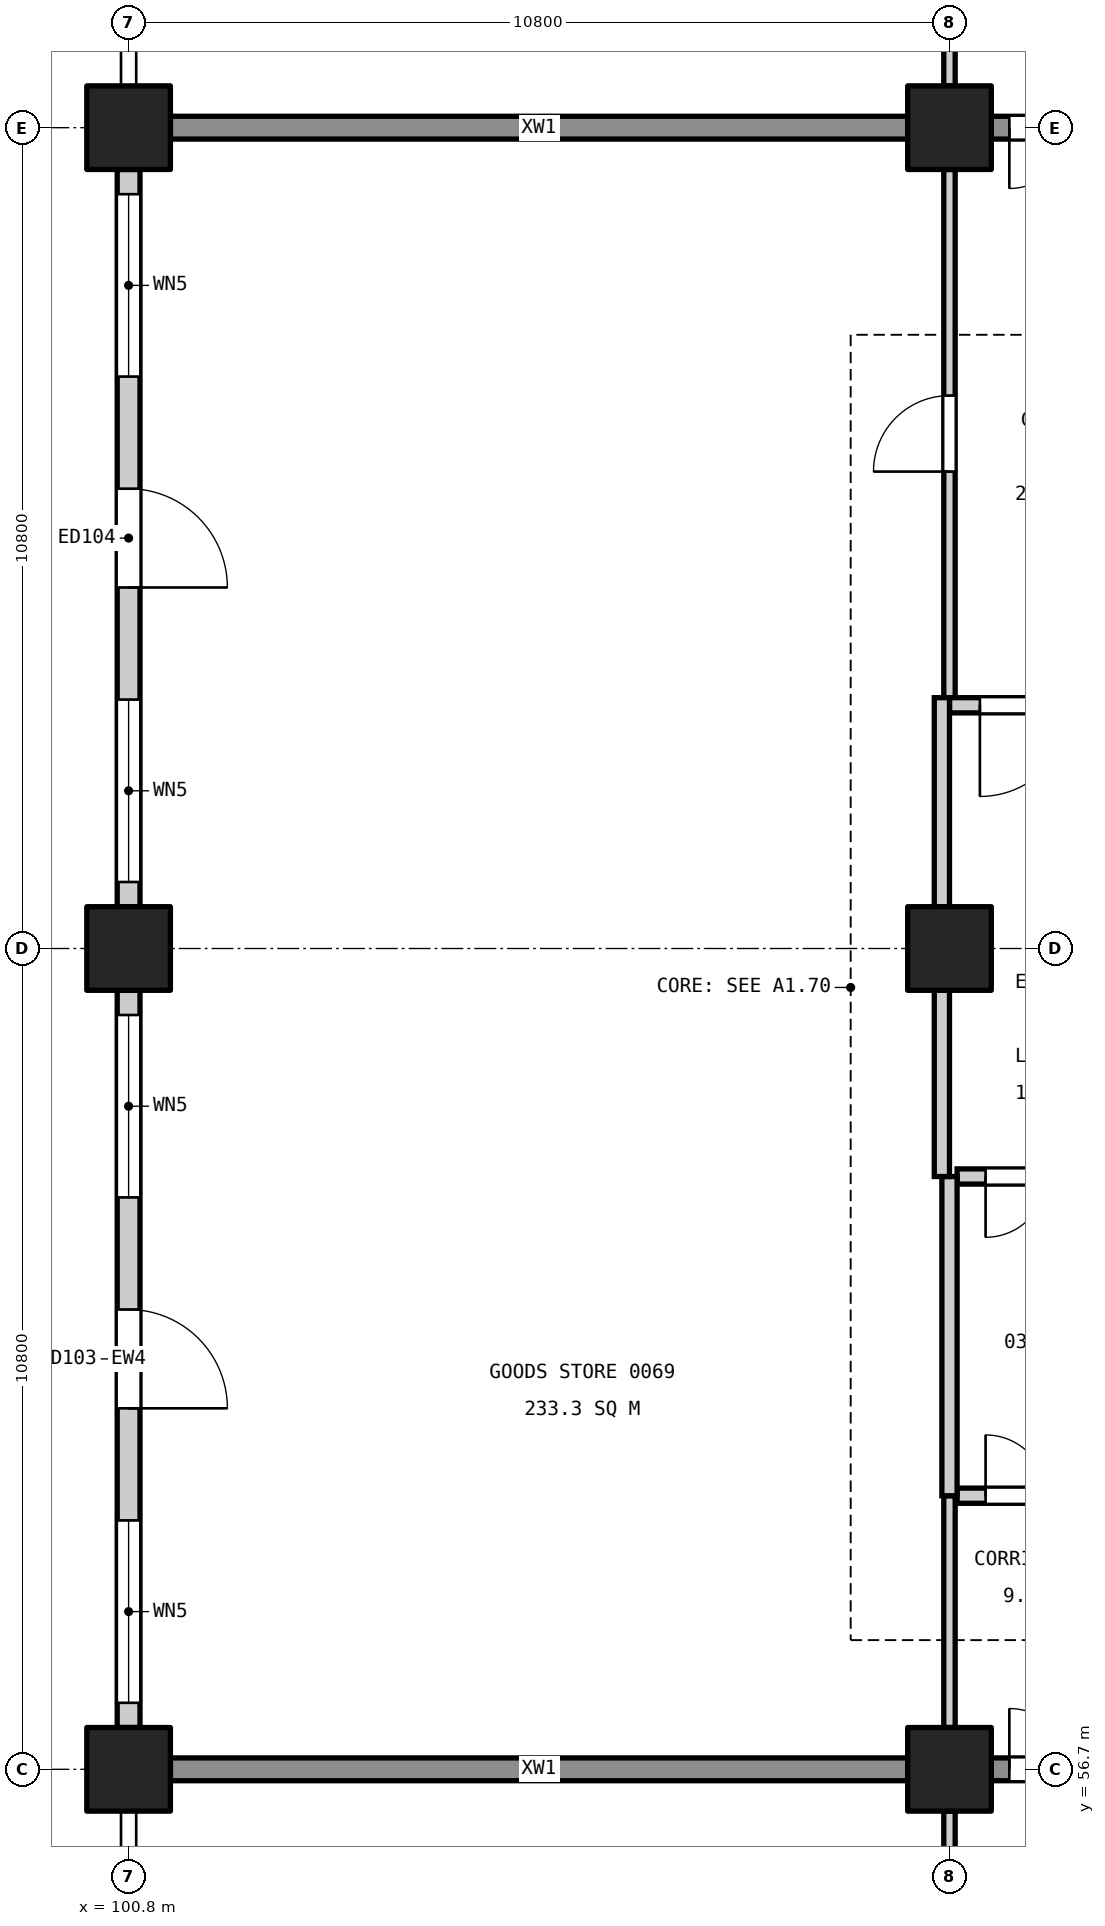
"""IFC4 building model, lengths in metres.
Left out: names, types, materials, properties, quantities, classifications, styles, units other than length and angle.
Written with IfcOpenShell. Run it as: python <this file> out.ifc"""

import sys

from ifc_helpers import new_model, si_unit, direction, frame, frame_2d, origin, origin_2d, place, context, subcontext, project, spatial, rectangle, extrude, element, fill, save


model = new_model("IFC4")
c1 = context("Model", 3, precision=1e-05, world=origin(), true_north=direction((0.0, 1.0)))
c2 = subcontext(c1, "Body", "Model", "MODEL_VIEW")
j1 = project(units=[si_unit("LENGTHUNIT", "METRE"), si_unit("PLANEANGLEUNIT", "RADIAN")], contexts=[c1])
p1 = place(None, origin())
s1 = spatial("IfcSite", under=j1, at=p1, CompositionType="ELEMENT")
p2 = place(p1, origin())
s2 = spatial("IfcBuilding", under=s1, at=p2, CompositionType="ELEMENT")
p3 = place(p2, origin())
s3 = spatial("IfcBuildingStorey", under=s2, at=p3, CompositionType="ELEMENT", Elevation=0.0)
for number, where, z_axis, x_axis in (
    (1, (111.6, 56.7, 0.0), (0.0, 0.0, 1.0), (1.0, 0.0, 0.0)),
    (2, (111.6, 67.5, 0.0), (0.0, 0.0, 1.0), (1.0, 0.0, 0.0)),
    (3, (111.6, 78.3, 0.0), (0.0, 0.0, 1.0), (1.0, 0.0, 0.0)),
    (4, (100.8, 56.7, 0.0), (0.0, 0.0, 1.0), (1.0, 0.0, 0.0)),
    (5, (100.8, 67.5, 0.0), (0.0, 0.0, 1.0), (1.0, 0.0, 0.0)),
    (6, (100.8, 78.3, 0.0), (0.0, 0.0, 1.0), (1.0, 0.0, 0.0)),
):
    element("IfcColumn", number, at=place(p3, frame(where, z_axis=z_axis, x_axis=x_axis)), inside=s3, PredefinedType="COLUMN", context=c2, shape_type="SweptSolid", body=[
        extrude(rectangle(XDim=1.1, YDim=1.1, at=origin_2d()), origin(), (0.0, 0.0, 1.0), 6.0),
    ])
p4 = place(p3, frame((118.25, 56.7, 0.0), z_axis=(0.0, 0.0, 1.0), x_axis=(-1.0, 0.0, 0.0)))
e7 = element("IfcWall", 7, at=p4, inside=s3, PredefinedType="SHEAR", context=c2, shape_type="SweptSolid", body=[
    extrude(rectangle(XDim=6.1, YDim=0.3, at=frame_2d((3.05, 0.0))), origin(), (0.0, 0.0, 1.0), 5.7),
])
p5 = place(p4, frame((4.262, 0.0, 0.0)))
e8 = element("IfcOpeningElement", 8, at=p5, cuts=e7, PredefinedType="OPENING", context=c2, shape_type="SweptSolid", body=[
    extrude(rectangle(XDim=1.6, YDim=2.1, at=frame_2d((0.8, 1.05))), frame((0.0, 0.16, 0.0), z_axis=(0.0, -1.0, 0.0), x_axis=(1.0, 0.0, 0.0)), (0.0, 0.0, 1.0), 0.32),
])
p6 = place(p3, frame((111.05, 56.7, 0.0), z_axis=(0.0, 0.0, 1.0), x_axis=(-1.0, 0.0, 0.0)))
e9 = element("IfcWall", 9, at=p6, inside=s3, PredefinedType="SHEAR", context=c2, shape_type="SweptSolid", body=[
    extrude(rectangle(XDim=9.7, YDim=0.3, at=frame_2d((4.85, 0.0))), origin(), (0.0, 0.0, 1.0), 5.7),
])
p7 = place(p3, frame((118.25, 78.3, 0.0), z_axis=(0.0, 0.0, 1.0), x_axis=(-1.0, 0.0, 0.0)))
e10 = element("IfcWall", 10, at=p7, inside=s3, PredefinedType="SHEAR", context=c2, shape_type="SweptSolid", body=[
    extrude(rectangle(XDim=6.1, YDim=0.3, at=frame_2d((3.05, 0.0))), origin(), (0.0, 0.0, 1.0), 5.7),
])
p8 = place(p7, frame((4.262, 0.0, 0.0)))
e11 = element("IfcOpeningElement", 11, at=p8, cuts=e10, PredefinedType="OPENING", context=c2, shape_type="SweptSolid", body=[
    extrude(rectangle(XDim=1.6, YDim=2.1, at=frame_2d((0.8, 1.05))), frame((0.0, 0.16, 0.0), z_axis=(0.0, -1.0, 0.0), x_axis=(1.0, 0.0, 0.0)), (0.0, 0.0, 1.0), 0.32),
])
p9 = place(p3, frame((111.05, 78.3, 0.0), z_axis=(0.0, 0.0, 1.0), x_axis=(-1.0, 0.0, 0.0)))
e12 = element("IfcWall", 12, at=p9, inside=s3, PredefinedType="SHEAR", context=c2, shape_type="SweptSolid", body=[
    extrude(rectangle(XDim=9.7, YDim=0.3, at=frame_2d((4.85, 0.0))), origin(), (0.0, 0.0, 1.0), 5.7),
])
p10 = place(p3, frame((100.8, 57.25, 0.0), z_axis=(0.0, 0.0, 1.0), x_axis=(0.0, 1.0, 0.0)))
e13 = element("IfcWall", 13, at=p10, inside=s3, PredefinedType="STANDARD", context=c2, shape_type="SweptSolid", body=[
    extrude(rectangle(XDim=9.7, YDim=0.3, at=frame_2d((4.85, 0.0))), origin(), (0.0, 0.0, 1.0), 4.6),
])
p11 = place(p10, frame((0.325, 0.0, 0.9)))
e14 = element("IfcOpeningElement", 14, at=p11, cuts=e13, PredefinedType="OPENING", context=c2, shape_type="SweptSolid", body=[
    extrude(rectangle(XDim=2.4, YDim=3.0, at=frame_2d((1.2, 1.5))), frame((0.0, 0.16, 0.0), z_axis=(0.0, -1.0, 0.0), x_axis=(1.0, 0.0, 0.0)), (0.0, 0.0, 1.0), 0.32),
])
p12 = place(p10, frame((6.975, 0.0, 0.9)))
e15 = element("IfcOpeningElement", 15, at=p12, cuts=e13, PredefinedType="OPENING", context=c2, shape_type="SweptSolid", body=[
    extrude(rectangle(XDim=2.4, YDim=3.0, at=frame_2d((1.2, 1.5))), frame((0.0, 0.16, 0.0), z_axis=(0.0, -1.0, 0.0), x_axis=(1.0, 0.0, 0.0)), (0.0, 0.0, 1.0), 0.32),
])
p13 = place(p10, frame((4.2, 0.0, 0.0)))
e16 = element("IfcOpeningElement", 16, at=p13, cuts=e13, PredefinedType="OPENING", context=c2, shape_type="SweptSolid", body=[
    extrude(rectangle(XDim=1.3, YDim=2.4, at=frame_2d((0.65, 1.2))), frame((0.0, 0.16, 0.0), z_axis=(0.0, -1.0, 0.0), x_axis=(1.0, 0.0, 0.0)), (0.0, 0.0, 1.0), 0.32),
])
p14 = place(p3, frame((100.8, 68.05, 0.0), z_axis=(0.0, 0.0, 1.0), x_axis=(0.0, 1.0, 0.0)))
e17 = element("IfcWall", 17, at=p14, inside=s3, PredefinedType="STANDARD", context=c2, shape_type="SweptSolid", body=[
    extrude(rectangle(XDim=9.7, YDim=0.3, at=frame_2d((4.85, 0.0))), origin(), (0.0, 0.0, 1.0), 4.6),
])
p15 = place(p14, frame((0.325, 0.0, 0.9)))
e18 = element("IfcOpeningElement", 18, at=p15, cuts=e17, PredefinedType="OPENING", context=c2, shape_type="SweptSolid", body=[
    extrude(rectangle(XDim=2.4, YDim=3.0, at=frame_2d((1.2, 1.5))), frame((0.0, 0.16, 0.0), z_axis=(0.0, -1.0, 0.0), x_axis=(1.0, 0.0, 0.0)), (0.0, 0.0, 1.0), 0.32),
])
p16 = place(p14, frame((6.975, 0.0, 0.9)))
e19 = element("IfcOpeningElement", 19, at=p16, cuts=e17, PredefinedType="OPENING", context=c2, shape_type="SweptSolid", body=[
    extrude(rectangle(XDim=2.4, YDim=3.0, at=frame_2d((1.2, 1.5))), frame((0.0, 0.16, 0.0), z_axis=(0.0, -1.0, 0.0), x_axis=(1.0, 0.0, 0.0)), (0.0, 0.0, 1.0), 0.32),
])
p17 = place(p14, frame((4.2, 0.0, 0.0)))
e20 = element("IfcOpeningElement", 20, at=p17, cuts=e17, PredefinedType="OPENING", context=c2, shape_type="SweptSolid", body=[
    extrude(rectangle(XDim=1.3, YDim=2.4, at=frame_2d((0.65, 1.2))), frame((0.0, 0.16, 0.0), z_axis=(0.0, -1.0, 0.0), x_axis=(1.0, 0.0, 0.0)), (0.0, 0.0, 1.0), 0.32),
])
p18 = place(p3, frame((114.05, 60.3, 0.0), z_axis=(0.0, 0.0, 1.0), x_axis=(-1.0, 0.0, 0.0)))
e21 = element("IfcWall", 21, at=p18, inside=s3, PredefinedType="PARTITIONING", context=c2, shape_type="SweptSolid", body=[
    extrude(rectangle(XDim=2.35, YDim=0.2, at=frame_2d((1.175, 0.0))), origin(), (0.0, 0.0, 1.0), 4.9),
])
p19 = place(p18, frame((0.375, 0.0, 0.0)))
e22 = element("IfcOpeningElement", 22, at=p19, cuts=e21, PredefinedType="OPENING", context=c2, shape_type="SweptSolid", body=[
    extrude(rectangle(XDim=1.6, YDim=2.1, at=frame_2d((0.8, 1.05))), frame((0.0, 0.11, 0.0), z_axis=(0.0, -1.0, 0.0), x_axis=(1.0, 0.0, 0.0)), (0.0, 0.0, 1.0), 0.22),
])
p20 = place(p3, frame((114.05, 64.5, 0.0), z_axis=(0.0, 0.0, 1.0), x_axis=(-1.0, 0.0, 0.0)))
e23 = element("IfcWall", 23, at=p20, inside=s3, PredefinedType="PARTITIONING", context=c2, shape_type="SweptSolid", body=[
    extrude(rectangle(XDim=2.35, YDim=0.2, at=frame_2d((1.175, 0.0))), origin(), (0.0, 0.0, 1.0), 4.6),
])
p21 = place(p20, frame((0.375, 0.0, 0.0)))
e24 = element("IfcOpeningElement", 24, at=p21, cuts=e23, PredefinedType="OPENING", context=c2, shape_type="SweptSolid", body=[
    extrude(rectangle(XDim=1.6, YDim=2.1, at=frame_2d((0.8, 1.05))), frame((0.0, 0.11, 0.0), z_axis=(0.0, -1.0, 0.0), x_axis=(1.0, 0.0, 0.0)), (0.0, 0.0, 1.0), 0.22),
])
p22 = place(p3, frame((111.6, 46.45, 0.0), z_axis=(0.0, 0.0, 1.0), x_axis=(0.0, 1.0, 0.0)))
e25 = element("IfcWall", 25, at=p22, inside=s3, PredefinedType="PARTITIONING", context=c2, shape_type="SweptSolid", body=[
    extrude(rectangle(XDim=9.7, YDim=0.15, at=frame_2d((4.85, 0.0))), origin(), (0.0, 0.0, 1.0), 4.6),
])
p23 = place(p22, frame((4.25, 0.0, 0.0)))
e26 = element("IfcOpeningElement", 26, at=p23, cuts=e25, PredefinedType="OPENING", context=c2, shape_type="SweptSolid", body=[
    extrude(rectangle(XDim=1.2, YDim=2.1, at=frame_2d((0.6, 1.05))), frame((0.0, 0.085, 0.0), z_axis=(0.0, -1.0, 0.0), x_axis=(1.0, 0.0, 0.0)), (0.0, 0.0, 1.0), 0.17),
])
p24 = place(p22, frame((0.925, 0.0, 0.0)))
e27 = element("IfcOpeningElement", 27, at=p24, cuts=e25, PredefinedType="OPENING", context=c2, shape_type="SweptSolid", body=[
    extrude(rectangle(XDim=1.2, YDim=2.1, at=frame_2d((0.6, 1.05))), frame((0.0, 0.085, 0.0), z_axis=(0.0, -1.0, 0.0), x_axis=(1.0, 0.0, 0.0)), (0.0, 0.0, 1.0), 0.17),
])
p25 = place(p22, frame((7.575, 0.0, 0.0)))
e28 = element("IfcOpeningElement", 28, at=p25, cuts=e25, PredefinedType="OPENING", context=c2, shape_type="SweptSolid", body=[
    extrude(rectangle(XDim=1.2, YDim=2.1, at=frame_2d((0.6, 1.05))), frame((0.0, 0.085, 0.0), z_axis=(0.0, -1.0, 0.0), x_axis=(1.0, 0.0, 0.0)), (0.0, 0.0, 1.0), 0.17),
])
p26 = place(p3, frame((111.6, 57.25, 0.0), z_axis=(0.0, 0.0, 1.0), x_axis=(0.0, 1.0, 0.0)))
e29 = element("IfcWall", 29, at=p26, inside=s3, PredefinedType="PARTITIONING", context=c2, shape_type="SweptSolid", body=[
    extrude(rectangle(XDim=3.05, YDim=0.15, at=frame_2d((1.525, 0.0))), origin(), (0.0, 0.0, 1.0), 4.6),
])
p27 = place(p3, frame((111.6, 60.3, 0.0), z_axis=(0.0, 0.0, 1.0), x_axis=(0.0, 1.0, 0.0)))
e30 = element("IfcWall", 30, at=p27, inside=s3, PredefinedType="PARTITIONING", context=c2, shape_type="SweptSolid", body=[
    extrude(rectangle(XDim=4.2, YDim=0.2, at=frame_2d((2.1, 0.0))), origin(), (0.0, 0.0, 1.0), 4.6),
])
p28 = place(p3, frame((111.6, 70.8, 0.0), z_axis=(0.0, 0.0, 1.0), x_axis=(0.0, 1.0, 0.0)))
e31 = element("IfcWall", 31, at=p28, inside=s3, PredefinedType="PARTITIONING", context=c2, shape_type="SweptSolid", body=[
    extrude(rectangle(XDim=6.95, YDim=0.15, at=frame_2d((3.475, 0.0))), origin(), (0.0, 0.0, 1.0), 4.6),
])
p29 = place(p28, frame((2.975, 0.0, 0.0)))
e32 = element("IfcOpeningElement", 32, at=p29, cuts=e31, PredefinedType="OPENING", context=c2, shape_type="SweptSolid", body=[
    extrude(rectangle(XDim=1.0, YDim=2.1, at=frame_2d((0.5, 1.05))), frame((0.0, 0.085, 0.0), z_axis=(0.0, -1.0, 0.0), x_axis=(1.0, 0.0, 0.0)), (0.0, 0.0, 1.0), 0.17),
])
p30 = place(p3, frame((111.6, 78.85, 0.0), z_axis=(0.0, 0.0, 1.0), x_axis=(0.0, 1.0, 0.0)))
e33 = element("IfcWall", 33, at=p30, inside=s3, PredefinedType="PARTITIONING", context=c2, shape_type="SweptSolid", body=[
    extrude(rectangle(XDim=9.7, YDim=0.15, at=frame_2d((4.85, 0.0))), origin(), (0.0, 0.0, 1.0), 4.6),
])
p31 = place(p30, frame((2.725, 0.0, 0.0)))
e34 = element("IfcOpeningElement", 34, at=p31, cuts=e33, PredefinedType="OPENING", context=c2, shape_type="SweptSolid", body=[
    extrude(rectangle(XDim=1.2, YDim=2.1, at=frame_2d((0.6, 1.05))), frame((0.0, 0.085, 0.0), z_axis=(0.0, -1.0, 0.0), x_axis=(1.0, 0.0, 0.0)), (0.0, 0.0, 1.0), 0.17),
])
p32 = place(p30, frame((7.575, 0.0, 0.0)))
e35 = element("IfcOpeningElement", 35, at=p32, cuts=e33, PredefinedType="OPENING", context=c2, shape_type="SweptSolid", body=[
    extrude(rectangle(XDim=1.2, YDim=2.1, at=frame_2d((0.6, 1.05))), frame((0.0, 0.085, 0.0), z_axis=(0.0, -1.0, 0.0), x_axis=(1.0, 0.0, 0.0)), (0.0, 0.0, 1.0), 0.17),
])
p33 = place(p3, frame((114.05, 70.7, 0.0), z_axis=(0.0, 0.0, 1.0), x_axis=(-1.0, 0.0, 0.0)))
e36 = element("IfcWall", 36, at=p33, inside=s3, PredefinedType="PARTITIONING", context=c2, shape_type="SweptSolid", body=[
    extrude(rectangle(XDim=2.45, YDim=0.2, at=frame_2d((1.225, 0.0))), origin(), (0.0, 0.0, 1.0), 4.6),
])
p34 = place(p33, frame((0.85, 0.0, 0.0)))
e37 = element("IfcOpeningElement", 37, at=p34, cuts=e36, PredefinedType="OPENING", context=c2, shape_type="SweptSolid", body=[
    extrude(rectangle(XDim=1.2, YDim=2.1, at=frame_2d((0.6, 1.05))), frame((0.0, 0.11, 0.0), z_axis=(0.0, -1.0, 0.0), x_axis=(1.0, 0.0, 0.0)), (0.0, 0.0, 1.0), 0.22),
])
p35 = place(p3, frame((111.5, 64.5, 0.0), z_axis=(0.0, 0.0, 1.0), x_axis=(0.0, 1.0, 0.0)))
e38 = element("IfcWall", 38, at=p35, inside=s3, PredefinedType="PARTITIONING", context=c2, shape_type="SweptSolid", body=[
    extrude(rectangle(XDim=2.45, YDim=0.2, at=frame_2d((1.225, 0.0))), origin(), (0.0, 0.0, 1.0), 4.6),
])
p36 = place(p3, frame((111.5, 68.05, 0.0), z_axis=(0.0, 0.0, 1.0), x_axis=(0.0, 1.0, 0.0)))
e39 = element("IfcWall", 39, at=p36, inside=s3, PredefinedType="PARTITIONING", context=c2, shape_type="SweptSolid", body=[
    extrude(rectangle(XDim=2.75, YDim=0.2, at=frame_2d((1.375, 0.0))), origin(), (0.0, 0.0, 1.0), 4.6),
])
p37 = place(p11, origin())
e40 = element("IfcWindow", 40, at=p37, inside=s3, PartitioningType="SINGLE_PANEL", PredefinedType="WINDOW", context=c2, shape_type="SweptSolid", body=[
    extrude(rectangle(XDim=2.4, YDim=3.0, at=frame_2d((1.2, 1.5))), frame((0.0, 0.03, 0.0), z_axis=(0.0, -1.0, 0.0), x_axis=(1.0, 0.0, 0.0)), (0.0, 0.0, 1.0), 0.06),
])
fill(e14, e40)
p38 = place(p12, origin())
e41 = element("IfcWindow", 41, at=p38, inside=s3, PartitioningType="SINGLE_PANEL", PredefinedType="WINDOW", context=c2, shape_type="SweptSolid", body=[
    extrude(rectangle(XDim=2.4, YDim=3.0, at=frame_2d((1.2, 1.5))), frame((0.0, 0.03, 0.0), z_axis=(0.0, -1.0, 0.0), x_axis=(1.0, 0.0, 0.0)), (0.0, 0.0, 1.0), 0.06),
])
fill(e15, e41)
p39 = place(p13, frame((1.3, 0.0, 0.0), z_axis=(0.0, 0.0, 1.0), x_axis=(-1.0, 0.0, 0.0)))
e42 = element("IfcDoor", 42, at=p39, inside=s3, OperationType="SINGLE_SWING_RIGHT", PredefinedType="DOOR", context=c2, shape_type="SweptSolid", body=[
    extrude(rectangle(XDim=1.3, YDim=2.4, at=frame_2d((0.65, 1.2))), frame((0.0, 0.025, 0.0), z_axis=(0.0, -1.0, 0.0), x_axis=(1.0, 0.0, 0.0)), (0.0, 0.0, 1.0), 0.05),
])
fill(e16, e42)
p40 = place(p15, origin())
e43 = element("IfcWindow", 43, at=p40, inside=s3, PartitioningType="SINGLE_PANEL", PredefinedType="WINDOW", context=c2, shape_type="SweptSolid", body=[
    extrude(rectangle(XDim=2.4, YDim=3.0, at=frame_2d((1.2, 1.5))), frame((0.0, 0.03, 0.0), z_axis=(0.0, -1.0, 0.0), x_axis=(1.0, 0.0, 0.0)), (0.0, 0.0, 1.0), 0.06),
])
fill(e18, e43)
p41 = place(p16, origin())
e44 = element("IfcWindow", 44, at=p41, inside=s3, PartitioningType="SINGLE_PANEL", PredefinedType="WINDOW", context=c2, shape_type="SweptSolid", body=[
    extrude(rectangle(XDim=2.4, YDim=3.0, at=frame_2d((1.2, 1.5))), frame((0.0, 0.03, 0.0), z_axis=(0.0, -1.0, 0.0), x_axis=(1.0, 0.0, 0.0)), (0.0, 0.0, 1.0), 0.06),
])
fill(e19, e44)
p42 = place(p17, frame((1.3, 0.0, 0.0), z_axis=(0.0, 0.0, 1.0), x_axis=(-1.0, 0.0, 0.0)))
e45 = element("IfcDoor", 45, at=p42, inside=s3, OperationType="SINGLE_SWING_RIGHT", PredefinedType="DOOR", context=c2, shape_type="SweptSolid", body=[
    extrude(rectangle(XDim=1.3, YDim=2.4, at=frame_2d((0.65, 1.2))), frame((0.0, 0.025, 0.0), z_axis=(0.0, -1.0, 0.0), x_axis=(1.0, 0.0, 0.0)), (0.0, 0.0, 1.0), 0.05),
])
fill(e20, e45)
p43 = place(p29, origin())
e46 = element("IfcDoor", 46, at=p43, inside=s3, OperationType="SINGLE_SWING_LEFT", PredefinedType="DOOR", context=c2, shape_type="SweptSolid", body=[
    extrude(rectangle(XDim=1.0, YDim=2.1, at=frame_2d((0.5, 1.05))), frame((0.0, 0.025, 0.0), z_axis=(0.0, -1.0, 0.0), x_axis=(1.0, 0.0, 0.0)), (0.0, 0.0, 1.0), 0.05),
])
fill(e32, e46)
p44 = place(p34, origin())
e47 = element("IfcDoor", 47, at=p44, inside=s3, OperationType="SINGLE_SWING_RIGHT", PredefinedType="DOOR", context=c2, shape_type="SweptSolid", body=[
    extrude(rectangle(XDim=1.2, YDim=2.1, at=frame_2d((0.6, 1.05))), frame((0.0, 0.025, 0.0), z_axis=(0.0, -1.0, 0.0), x_axis=(1.0, 0.0, 0.0)), (0.0, 0.0, 1.0), 0.05),
])
fill(e37, e47)
p45 = place(p19, frame((1.6, 0.0, 0.0), z_axis=(0.0, 0.0, 1.0), x_axis=(-1.0, 0.0, 0.0)))
e48 = element("IfcDoor", 48, at=p45, inside=s3, OperationType="DOUBLE_DOOR_SINGLE_SWING", PredefinedType="DOOR", context=c2, shape_type="SweptSolid", body=[
    extrude(rectangle(XDim=1.6, YDim=2.1, at=frame_2d((0.8, 1.05))), frame((0.0, 0.025, 0.0), z_axis=(0.0, -1.0, 0.0), x_axis=(1.0, 0.0, 0.0)), (0.0, 0.0, 1.0), 0.05),
])
fill(e22, e48)
p46 = place(p21, origin())
e49 = element("IfcDoor", 49, at=p46, inside=s3, OperationType="DOUBLE_DOOR_SINGLE_SWING", PredefinedType="DOOR", context=c2, shape_type="SweptSolid", body=[
    extrude(rectangle(XDim=1.6, YDim=2.1, at=frame_2d((0.8, 1.05))), frame((0.0, 0.025, 0.0), z_axis=(0.0, -1.0, 0.0), x_axis=(1.0, 0.0, 0.0)), (0.0, 0.0, 1.0), 0.05),
])
fill(e24, e49)
p47 = place(p5, frame((1.6, 0.0, 0.0), z_axis=(0.0, 0.0, 1.0), x_axis=(-1.0, 0.0, 0.0)))
e50 = element("IfcDoor", 50, at=p47, inside=s3, OperationType="DOUBLE_DOOR_SINGLE_SWING", PredefinedType="DOOR", context=c2, shape_type="SweptSolid", body=[
    extrude(rectangle(XDim=1.6, YDim=2.1, at=frame_2d((0.8, 1.05))), frame((0.0, 0.025, 0.0), z_axis=(0.0, -1.0, 0.0), x_axis=(1.0, 0.0, 0.0)), (0.0, 0.0, 1.0), 0.05),
])
fill(e8, e50)
p48 = place(p8, origin())
e51 = element("IfcDoor", 51, at=p48, inside=s3, OperationType="DOUBLE_DOOR_SINGLE_SWING", PredefinedType="DOOR", context=c2, shape_type="SweptSolid", body=[
    extrude(rectangle(XDim=1.6, YDim=2.1, at=frame_2d((0.8, 1.05))), frame((0.0, 0.025, 0.0), z_axis=(0.0, -1.0, 0.0), x_axis=(1.0, 0.0, 0.0)), (0.0, 0.0, 1.0), 0.05),
])
fill(e11, e51)
save(model, sys.argv[1])
